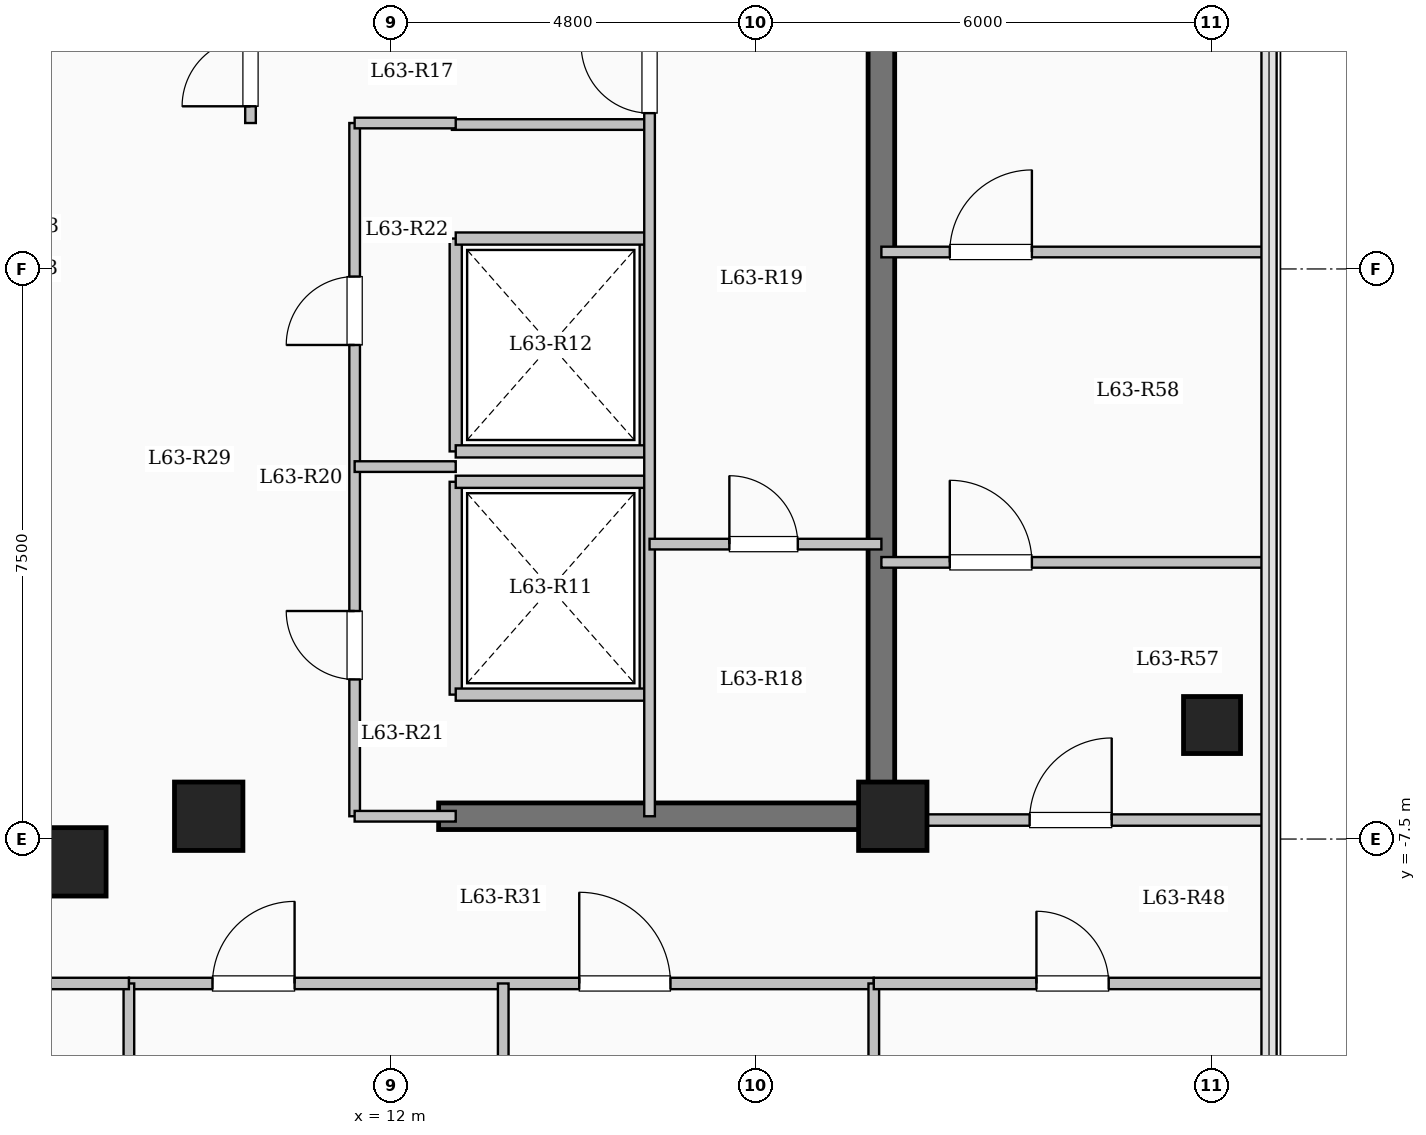
"""IFC4 building model, lengths in metres.
Left out: names, types, materials, properties, quantities, classifications, styles, units other than length and angle.
Written with IfcOpenShell. Run it as: python <this file> out.ifc"""

import sys

from ifc_helpers import new_model, si_unit, direction, frame, frame_2d, origin, origin_2d, place, context, subcontext, project, spatial, rectangle, extrude, element, fill, save


model = new_model("IFC4")
c1 = context("Model", 3, precision=1e-05, world=origin(), true_north=direction((0.0, 1.0)))
c2 = subcontext(c1, "Body", "Model", "MODEL_VIEW")
j1 = project(units=[si_unit("LENGTHUNIT", "METRE"), si_unit("PLANEANGLEUNIT", "RADIAN")], contexts=[c1])
p1 = place(None, origin())
s1 = spatial("IfcSite", under=j1, at=p1, CompositionType="ELEMENT")
p2 = place(p1, origin())
s2 = spatial("IfcBuilding", under=s1, at=p2, CompositionType="ELEMENT")
p3 = place(p2, frame((0.0, 0.0, 231.75)))
s3 = spatial("IfcBuildingStorey", under=s2, at=p3, CompositionType="ELEMENT", Elevation=231.75)
for number, where, z_axis, x_axis in (
    (1, (7.8, -7.8, 0.0), (0.0, 0.0, 1.0), (1.0, 0.0, 0.0)),
    (2, (9.6, -7.2, 0.0), (0.0, 0.0, 1.0), (1.0, 0.0, 0.0)),
    (3, (18.6, -7.2, 0.0), (0.0, 0.0, 1.0), (1.0, 0.0, 0.0)),
):
    element("IfcColumn", number, at=place(p3, frame(where, z_axis=z_axis, x_axis=x_axis)), inside=s3, PredefinedType="COLUMN", context=c2, shape_type="SweptSolid", body=[
        extrude(rectangle(XDim=0.9, YDim=0.9, at=origin_2d()), origin(), (0.0, 0.0, 1.0), 4.65),
    ])
p4 = place(p3, frame((22.8, -6.0, 0.0), z_axis=(0.0, 0.0, 1.0), x_axis=(1.0, 0.0, 0.0)))
e4 = element("IfcColumn", 4, at=p4, inside=s3, PredefinedType="COLUMN", context=c2, shape_type="SweptSolid", body=[
    extrude(rectangle(XDim=0.75, YDim=0.75, at=origin_2d()), origin(), (0.0, 0.0, 1.0), 4.65),
])
for number, where, z_axis, x_axis in (
    (5, (12.85, -5.6, 0.0), (0.0, 0.0, 1.0), (0.0, 1.0, 0.0)),
    (6, (15.35, -5.6, 0.0), (0.0, 0.0, 1.0), (0.0, 1.0, 0.0)),
):
    element("IfcWall", number, at=place(p3, frame(where, z_axis=z_axis, x_axis=x_axis)), inside=s3, PredefinedType="SOLIDWALL", context=c2, shape_type="SweptSolid", body=[
        extrude(rectangle(XDim=2.8, YDim=0.16, at=frame_2d((1.4, 0.0))), origin(), (0.0, 0.0, 1.0), 4.35),
    ])
for number, where, z_axis, x_axis in (
    (7, (12.85, -5.6, 0.0), (0.0, 0.0, 1.0), (1.0, 0.0, 0.0)),
    (8, (12.85, -2.8, 0.0), (0.0, 0.0, 1.0), (1.0, 0.0, 0.0)),
):
    element("IfcWall", number, at=place(p3, frame(where, z_axis=z_axis, x_axis=x_axis)), inside=s3, PredefinedType="SOLIDWALL", context=c2, shape_type="SweptSolid", body=[
        extrude(rectangle(XDim=2.5, YDim=0.16, at=frame_2d((1.25, 0.0))), origin(), (0.0, 0.0, 1.0), 4.35),
    ])
for number, where, z_axis, x_axis in (
    (9, (12.85, -2.4, 0.0), (0.0, 0.0, 1.0), (0.0, 1.0, 0.0)),
    (10, (15.35, -2.4, 0.0), (0.0, 0.0, 1.0), (0.0, 1.0, 0.0)),
):
    element("IfcWall", number, at=place(p3, frame(where, z_axis=z_axis, x_axis=x_axis)), inside=s3, PredefinedType="SOLIDWALL", context=c2, shape_type="SweptSolid", body=[
        extrude(rectangle(XDim=2.8, YDim=0.16, at=frame_2d((1.4, 0.0))), origin(), (0.0, 0.0, 1.0), 4.35),
    ])
for number, where, z_axis, x_axis in (
    (11, (12.85, -2.4, 0.0), (0.0, 0.0, 1.0), (1.0, 0.0, 0.0)),
    (12, (12.85, 0.4, 0.0), (0.0, 0.0, 1.0), (1.0, 0.0, 0.0)),
):
    element("IfcWall", number, at=place(p3, frame(where, z_axis=z_axis, x_axis=x_axis)), inside=s3, PredefinedType="SOLIDWALL", context=c2, shape_type="SweptSolid", body=[
        extrude(rectangle(XDim=2.5, YDim=0.16, at=frame_2d((1.25, 0.0))), origin(), (0.0, 0.0, 1.0), 4.35),
    ])
p5 = place(p3, frame((18.45, -7.375, 0.0), z_axis=(0.0, 0.0, 1.0), x_axis=(0.0, 1.0, 0.0)))
e13 = element("IfcWall", 13, at=p5, inside=s3, PredefinedType="SHEAR", context=c2, shape_type="SweptSolid", body=[
    extrude(rectangle(XDim=14.05, YDim=0.35, at=frame_2d((7.025, 0.0))), origin(), (0.0, 0.0, 1.0), 4.65),
])
p6 = place(p3, frame((12.625, -7.2, 0.0), z_axis=(0.0, 0.0, 1.0), x_axis=(1.0, 0.0, 0.0)))
e14 = element("IfcWall", 14, at=p6, inside=s3, PredefinedType="SHEAR", context=c2, shape_type="SweptSolid", body=[
    extrude(rectangle(XDim=6.0, YDim=0.35, at=frame_2d((3.0, 0.0))), origin(), (0.0, 0.0, 1.0), 4.65),
])
p7 = place(p3, frame((12.8, 1.9, 0.0), z_axis=(0.0, 0.0, 1.0), x_axis=(1.0, 0.0, 0.0)))
e15 = element("IfcWall", 15, at=p7, inside=s3, PredefinedType="PARTITIONING", context=c2, shape_type="SweptSolid", body=[
    extrude(rectangle(XDim=2.6, YDim=0.14, at=frame_2d((1.3, 0.0))), origin(), (0.0, 0.0, 1.0), 4.35),
])
p8 = place(p3, frame((10.15, 1.92, 0.0), z_axis=(0.0, 0.0, 1.0), x_axis=(0.0, 1.0, 0.0)))
e16 = element("IfcWall", 16, at=p8, inside=s3, PredefinedType="PARTITIONING", context=c2, shape_type="SweptSolid", body=[
    extrude(rectangle(XDim=1.33, YDim=0.14, at=frame_2d((0.665, 0.0))), origin(), (0.0, 0.0, 1.0), 4.35),
])
p9 = place(p8, frame((0.22, 0.0, 0.0)))
e17 = element("IfcOpeningElement", 17, at=p9, cuts=e16, PredefinedType="OPENING", context=c2, shape_type="SweptSolid", body=[
    extrude(rectangle(XDim=0.9, YDim=2.08, at=frame_2d((0.45, 1.04))), frame((0.0, 0.08, 0.0), z_axis=(0.0, -1.0, 0.0), x_axis=(1.0, 0.0, 0.0)), (0.0, 0.0, 1.0), 0.16),
])
p10 = place(p3, frame((15.4, -7.2, 0.0), z_axis=(0.0, 0.0, 1.0), x_axis=(0.0, 1.0, 0.0)))
e18 = element("IfcWall", 18, at=p10, inside=s3, PredefinedType="PARTITIONING", context=c2, shape_type="SweptSolid", body=[
    extrude(rectangle(XDim=10.45, YDim=0.14, at=frame_2d((5.225, 0.0))), origin(), (0.0, 0.0, 1.0), 4.35),
])
p11 = place(p10, frame((9.25, 0.0, 0.0)))
e19 = element("IfcOpeningElement", 19, at=p11, cuts=e18, PredefinedType="OPENING", context=c2, shape_type="SweptSolid", body=[
    extrude(rectangle(XDim=0.9, YDim=2.08, at=frame_2d((0.45, 1.04))), frame((0.0, 0.08, 0.0), z_axis=(0.0, -1.0, 0.0), x_axis=(1.0, 0.0, 0.0)), (0.0, 0.0, 1.0), 0.16),
])
p12 = place(p3, frame((15.4, -3.62, 0.0), z_axis=(0.0, 0.0, 1.0), x_axis=(1.0, 0.0, 0.0)))
e20 = element("IfcWall", 20, at=p12, inside=s3, PredefinedType="PARTITIONING", context=c2, shape_type="SweptSolid", body=[
    extrude(rectangle(XDim=3.05, YDim=0.14, at=frame_2d((1.525, 0.0))), origin(), (0.0, 0.0, 1.0), 4.35),
])
p13 = place(p12, frame((1.05, 0.0, 0.0)))
e21 = element("IfcOpeningElement", 21, at=p13, cuts=e20, PredefinedType="OPENING", context=c2, shape_type="SweptSolid", body=[
    extrude(rectangle(XDim=0.9, YDim=2.08, at=frame_2d((0.45, 1.04))), frame((0.0, 0.08, 0.0), z_axis=(0.0, -1.0, 0.0), x_axis=(1.0, 0.0, 0.0)), (0.0, 0.0, 1.0), 0.16),
])
p14 = place(p3, frame((11.52, -7.2, 0.0), z_axis=(0.0, 0.0, 1.0), x_axis=(0.0, 1.0, 0.0)))
e22 = element("IfcWall", 22, at=p14, inside=s3, PredefinedType="PARTITIONING", context=c2, shape_type="SweptSolid", body=[
    extrude(rectangle(XDim=9.12, YDim=0.14, at=frame_2d((4.56, 0.0))), origin(), (0.0, 0.0, 1.0), 4.35),
])
p15 = place(p14, frame((1.8, 0.0, 0.0)))
e23 = element("IfcOpeningElement", 23, at=p15, cuts=e22, PredefinedType="OPENING", context=c2, shape_type="SweptSolid", body=[
    extrude(rectangle(XDim=0.9, YDim=2.08, at=frame_2d((0.45, 1.04))), frame((0.0, 0.08, 0.0), z_axis=(0.0, -1.0, 0.0), x_axis=(1.0, 0.0, 0.0)), (0.0, 0.0, 1.0), 0.16),
])
p16 = place(p14, frame((6.2, 0.0, 0.0)))
e24 = element("IfcOpeningElement", 24, at=p16, cuts=e22, PredefinedType="OPENING", context=c2, shape_type="SweptSolid", body=[
    extrude(rectangle(XDim=0.9, YDim=2.08, at=frame_2d((0.45, 1.04))), frame((0.0, 0.08, 0.0), z_axis=(0.0, -1.0, 0.0), x_axis=(1.0, 0.0, 0.0)), (0.0, 0.0, 1.0), 0.16),
])
p17 = place(p3, frame((11.52, 1.92, 0.0), z_axis=(0.0, 0.0, 1.0), x_axis=(1.0, 0.0, 0.0)))
e25 = element("IfcWall", 25, at=p17, inside=s3, PredefinedType="PARTITIONING", context=c2, shape_type="SweptSolid", body=[
    extrude(rectangle(XDim=1.33, YDim=0.14, at=frame_2d((0.665, 0.0))), origin(), (0.0, 0.0, 1.0), 4.35),
])
p18 = place(p3, frame((11.52, -7.2, 0.0), z_axis=(0.0, 0.0, 1.0), x_axis=(1.0, 0.0, 0.0)))
e26 = element("IfcWall", 26, at=p18, inside=s3, PredefinedType="PARTITIONING", context=c2, shape_type="SweptSolid", body=[
    extrude(rectangle(XDim=1.33, YDim=0.14, at=frame_2d((0.665, 0.0))), origin(), (0.0, 0.0, 1.0), 3.485),
])
p19 = place(p3, frame((11.52, -2.6, 0.0), z_axis=(0.0, 0.0, 1.0), x_axis=(1.0, 0.0, 0.0)))
e27 = element("IfcWall", 27, at=p19, inside=s3, PredefinedType="PARTITIONING", context=c2, shape_type="SweptSolid", body=[
    extrude(rectangle(XDim=1.33, YDim=0.14, at=frame_2d((0.665, 0.0))), origin(), (0.0, 0.0, 1.0), 4.35),
])
p20 = place(p3, frame((8.55, -9.4, 0.0), z_axis=(0.0, 0.0, 1.0), x_axis=(1.0, 0.0, 0.0)))
e28 = element("IfcWall", 28, at=p20, inside=s3, PredefinedType="PARTITIONING", context=c2, shape_type="SweptSolid", body=[
    extrude(rectangle(XDim=9.8, YDim=0.15, at=frame_2d((4.9, 0.0))), origin(), (0.0, 0.0, 1.0), 4.35),
])
p21 = place(p20, frame((1.1, 0.0, 0.0)))
e29 = element("IfcOpeningElement", 29, at=p21, cuts=e28, PredefinedType="OPENING", context=c2, shape_type="SweptSolid", body=[
    extrude(rectangle(XDim=1.08, YDim=2.15, at=frame_2d((0.54, 1.075))), frame((0.0, 0.085, 0.0), z_axis=(0.0, -1.0, 0.0), x_axis=(1.0, 0.0, 0.0)), (0.0, 0.0, 1.0), 0.17),
])
p22 = place(p20, frame((5.925, 0.0, 0.0)))
e30 = element("IfcOpeningElement", 30, at=p22, cuts=e28, PredefinedType="OPENING", context=c2, shape_type="SweptSolid", body=[
    extrude(rectangle(XDim=1.2, YDim=2.15, at=frame_2d((0.6, 1.075))), frame((0.0, 0.085, 0.0), z_axis=(0.0, -1.0, 0.0), x_axis=(1.0, 0.0, 0.0)), (0.0, 0.0, 1.0), 0.17),
])
p23 = place(p3, frame((8.55, -21.504, 0.0), z_axis=(0.0, 0.0, 1.0), x_axis=(0.0, 1.0, 0.0)))
e31 = element("IfcWall", 31, at=p23, inside=s3, PredefinedType="PARTITIONING", context=c2, shape_type="SweptSolid", body=[
    extrude(rectangle(XDim=12.104, YDim=0.14, at=frame_2d((6.052, 0.0))), origin(), (0.0, 0.0, 1.0), 4.35),
])
p24 = place(p3, frame((13.475, -20.9, 0.0), z_axis=(0.0, 0.0, 1.0), x_axis=(0.0, 1.0, 0.0)))
e32 = element("IfcWall", 32, at=p24, inside=s3, PredefinedType="PARTITIONING", context=c2, shape_type="SweptSolid", body=[
    extrude(rectangle(XDim=11.5, YDim=0.14, at=frame_2d((5.75, 0.0))), origin(), (0.0, 0.0, 1.0), 4.35),
])
p25 = place(p3, frame((-8.55, -9.4, 0.0), z_axis=(0.0, 0.0, 1.0), x_axis=(1.0, 0.0, 0.0)))
e33 = element("IfcWall", 33, at=p25, inside=s3, PredefinedType="PARTITIONING", context=c2, shape_type="SweptSolid", body=[
    extrude(rectangle(XDim=17.1, YDim=0.15, at=frame_2d((8.55, 0.0))), origin(), (0.0, 0.0, 1.0), 4.35),
])
p26 = place(p25, frame((1.85, 0.0, 0.0)))
e34 = element("IfcOpeningElement", 34, at=p26, cuts=e33, PredefinedType="OPENING", context=c2, shape_type="SweptSolid", body=[
    extrude(rectangle(XDim=1.08, YDim=2.15, at=frame_2d((0.54, 1.075))), frame((0.0, 0.085, 0.0), z_axis=(0.0, -1.0, 0.0), x_axis=(1.0, 0.0, 0.0)), (0.0, 0.0, 1.0), 0.17),
])
p27 = place(p25, frame((10.5, 0.0, 0.0)))
e35 = element("IfcOpeningElement", 35, at=p27, cuts=e33, PredefinedType="OPENING", context=c2, shape_type="SweptSolid", body=[
    extrude(rectangle(XDim=1.08, YDim=2.15, at=frame_2d((0.54, 1.075))), frame((0.0, 0.085, 0.0), z_axis=(0.0, -1.0, 0.0), x_axis=(1.0, 0.0, 0.0)), (0.0, 0.0, 1.0), 0.17),
])
p28 = place(p3, frame((18.45, -7.25, 0.0), z_axis=(0.0, 0.0, 1.0), x_axis=(1.0, 0.0, 0.0)))
e36 = element("IfcWall", 36, at=p28, inside=s3, PredefinedType="PARTITIONING", context=c2, shape_type="SweptSolid", body=[
    extrude(rectangle(XDim=5.13, YDim=0.15, at=frame_2d((2.565, 0.0))), origin(), (0.0, 0.0, 1.0), 4.35),
])
p29 = place(p28, frame((1.95, 0.0, 0.0)))
e37 = element("IfcOpeningElement", 37, at=p29, cuts=e36, PredefinedType="OPENING", context=c2, shape_type="SweptSolid", body=[
    extrude(rectangle(XDim=1.08, YDim=2.15, at=frame_2d((0.54, 1.075))), frame((0.0, 0.085, 0.0), z_axis=(0.0, -1.0, 0.0), x_axis=(1.0, 0.0, 0.0)), (0.0, 0.0, 1.0), 0.17),
])
p30 = place(p3, frame((18.35, -17.25, 0.0), z_axis=(0.0, 0.0, 1.0), x_axis=(0.0, 1.0, 0.0)))
e38 = element("IfcWall", 38, at=p30, inside=s3, PredefinedType="PARTITIONING", context=c2, shape_type="SweptSolid", body=[
    extrude(rectangle(XDim=7.85, YDim=0.14, at=frame_2d((3.925, 0.0))), origin(), (0.0, 0.0, 1.0), 4.35),
])
p31 = place(p3, frame((18.35, -9.4, 0.0), z_axis=(0.0, 0.0, 1.0), x_axis=(1.0, 0.0, 0.0)))
e39 = element("IfcWall", 39, at=p31, inside=s3, PredefinedType="PARTITIONING", context=c2, shape_type="SweptSolid", body=[
    extrude(rectangle(XDim=5.23, YDim=0.15, at=frame_2d((2.615, 0.0))), origin(), (0.0, 0.0, 1.0), 4.35),
])
p32 = place(p31, frame((2.14, 0.0, 0.0)))
e40 = element("IfcOpeningElement", 40, at=p32, cuts=e39, PredefinedType="OPENING", context=c2, shape_type="SweptSolid", body=[
    extrude(rectangle(XDim=0.95, YDim=2.15, at=frame_2d((0.475, 1.075))), frame((0.0, 0.085, 0.0), z_axis=(0.0, -1.0, 0.0), x_axis=(1.0, 0.0, 0.0)), (0.0, 0.0, 1.0), 0.17),
])
p33 = place(p3, frame((18.45, -3.86, 0.0), z_axis=(0.0, 0.0, 1.0), x_axis=(1.0, 0.0, 0.0)))
e41 = element("IfcWall", 41, at=p33, inside=s3, PredefinedType="PARTITIONING", context=c2, shape_type="SweptSolid", body=[
    extrude(rectangle(XDim=5.13, YDim=0.14, at=frame_2d((2.565, 0.0))), origin(), (0.0, 0.0, 1.0), 4.35),
])
p34 = place(p33, frame((0.9, 0.0, 0.0)))
e42 = element("IfcOpeningElement", 42, at=p34, cuts=e41, PredefinedType="OPENING", context=c2, shape_type="SweptSolid", body=[
    extrude(rectangle(XDim=1.08, YDim=2.15, at=frame_2d((0.54, 1.075))), frame((0.0, 0.08, 0.0), z_axis=(0.0, -1.0, 0.0), x_axis=(1.0, 0.0, 0.0)), (0.0, 0.0, 1.0), 0.16),
])
p35 = place(p3, frame((18.45, 0.223, 0.0), z_axis=(0.0, 0.0, 1.0), x_axis=(1.0, 0.0, 0.0)))
e43 = element("IfcWall", 43, at=p35, inside=s3, PredefinedType="PARTITIONING", context=c2, shape_type="SweptSolid", body=[
    extrude(rectangle(XDim=5.13, YDim=0.14, at=frame_2d((2.565, 0.0))), origin(), (0.0, 0.0, 1.0), 4.35),
])
p36 = place(p35, frame((0.9, 0.0, 0.0)))
e44 = element("IfcOpeningElement", 44, at=p36, cuts=e43, PredefinedType="OPENING", context=c2, shape_type="SweptSolid", body=[
    extrude(rectangle(XDim=1.08, YDim=2.15, at=frame_2d((0.54, 1.075))), frame((0.0, 0.08, 0.0), z_axis=(0.0, -1.0, 0.0), x_axis=(1.0, 0.0, 0.0)), (0.0, 0.0, 1.0), 0.16),
])
p37 = place(p9, origin())
e45 = element("IfcDoor", 45, at=p37, inside=s3, OperationType="SINGLE_SWING_LEFT", PredefinedType="DOOR", context=c2, shape_type="SweptSolid", body=[
    extrude(rectangle(XDim=0.9, YDim=2.08, at=frame_2d((0.45, 1.04))), frame((0.0, 0.025, 0.0), z_axis=(0.0, -1.0, 0.0), x_axis=(1.0, 0.0, 0.0)), (0.0, 0.0, 1.0), 0.05),
])
fill(e17, e45)
p38 = place(p11, origin())
e46 = element("IfcDoor", 46, at=p38, inside=s3, OperationType="SINGLE_SWING_RIGHT", PredefinedType="DOOR", context=c2, shape_type="SweptSolid", body=[
    extrude(rectangle(XDim=0.9, YDim=2.08, at=frame_2d((0.45, 1.04))), frame((0.0, 0.025, 0.0), z_axis=(0.0, -1.0, 0.0), x_axis=(1.0, 0.0, 0.0)), (0.0, 0.0, 1.0), 0.05),
])
fill(e19, e46)
p39 = place(p13, origin())
e47 = element("IfcDoor", 47, at=p39, inside=s3, OperationType="SINGLE_SWING_LEFT", PredefinedType="DOOR", context=c2, shape_type="SweptSolid", body=[
    extrude(rectangle(XDim=0.9, YDim=2.08, at=frame_2d((0.45, 1.04))), frame((0.0, 0.025, 0.0), z_axis=(0.0, -1.0, 0.0), x_axis=(1.0, 0.0, 0.0)), (0.0, 0.0, 1.0), 0.05),
])
fill(e21, e47)
p40 = place(p15, origin())
e48 = element("IfcDoor", 48, at=p40, inside=s3, OperationType="SINGLE_SWING_RIGHT", PredefinedType="DOOR", context=c2, shape_type="SweptSolid", body=[
    extrude(rectangle(XDim=0.9, YDim=2.08, at=frame_2d((0.45, 1.04))), frame((0.0, 0.025, 0.0), z_axis=(0.0, -1.0, 0.0), x_axis=(1.0, 0.0, 0.0)), (0.0, 0.0, 1.0), 0.05),
])
fill(e23, e48)
p41 = place(p16, origin())
e49 = element("IfcDoor", 49, at=p41, inside=s3, OperationType="SINGLE_SWING_LEFT", PredefinedType="DOOR", context=c2, shape_type="SweptSolid", body=[
    extrude(rectangle(XDim=0.9, YDim=2.08, at=frame_2d((0.45, 1.04))), frame((0.0, 0.025, 0.0), z_axis=(0.0, -1.0, 0.0), x_axis=(1.0, 0.0, 0.0)), (0.0, 0.0, 1.0), 0.05),
])
fill(e24, e49)
p42 = place(p21, origin())
e50 = element("IfcDoor", 50, at=p42, inside=s3, OperationType="SINGLE_SWING_RIGHT", PredefinedType="DOOR", context=c2, shape_type="SweptSolid", body=[
    extrude(rectangle(XDim=1.08, YDim=2.15, at=frame_2d((0.54, 1.075))), frame((0.0, 0.025, 0.0), z_axis=(0.0, -1.0, 0.0), x_axis=(1.0, 0.0, 0.0)), (0.0, 0.0, 1.0), 0.05),
])
fill(e29, e50)
p43 = place(p22, origin())
e51 = element("IfcDoor", 51, at=p43, inside=s3, OperationType="SINGLE_SWING_LEFT", PredefinedType="DOOR", context=c2, shape_type="SweptSolid", body=[
    extrude(rectangle(XDim=1.2, YDim=2.15, at=frame_2d((0.6, 1.075))), frame((0.0, 0.025, 0.0), z_axis=(0.0, -1.0, 0.0), x_axis=(1.0, 0.0, 0.0)), (0.0, 0.0, 1.0), 0.05),
])
fill(e30, e51)
p44 = place(p32, origin())
e52 = element("IfcDoor", 52, at=p44, inside=s3, OperationType="SINGLE_SWING_LEFT", PredefinedType="DOOR", context=c2, shape_type="SweptSolid", body=[
    extrude(rectangle(XDim=0.95, YDim=2.15, at=frame_2d((0.475, 1.075))), frame((0.0, 0.025, 0.0), z_axis=(0.0, -1.0, 0.0), x_axis=(1.0, 0.0, 0.0)), (0.0, 0.0, 1.0), 0.05),
])
fill(e40, e52)
p45 = place(p29, origin())
e53 = element("IfcDoor", 53, at=p45, inside=s3, OperationType="SINGLE_SWING_RIGHT", PredefinedType="DOOR", context=c2, shape_type="SweptSolid", body=[
    extrude(rectangle(XDim=1.08, YDim=2.15, at=frame_2d((0.54, 1.075))), frame((0.0, 0.025, 0.0), z_axis=(0.0, -1.0, 0.0), x_axis=(1.0, 0.0, 0.0)), (0.0, 0.0, 1.0), 0.05),
])
fill(e37, e53)
p46 = place(p34, origin())
e54 = element("IfcDoor", 54, at=p46, inside=s3, OperationType="SINGLE_SWING_LEFT", PredefinedType="DOOR", context=c2, shape_type="SweptSolid", body=[
    extrude(rectangle(XDim=1.08, YDim=2.15, at=frame_2d((0.54, 1.075))), frame((0.0, 0.025, 0.0), z_axis=(0.0, -1.0, 0.0), x_axis=(1.0, 0.0, 0.0)), (0.0, 0.0, 1.0), 0.05),
])
fill(e42, e54)
p47 = place(p36, origin())
e55 = element("IfcDoor", 55, at=p47, inside=s3, OperationType="SINGLE_SWING_RIGHT", PredefinedType="DOOR", context=c2, shape_type="SweptSolid", body=[
    extrude(rectangle(XDim=1.08, YDim=2.15, at=frame_2d((0.54, 1.075))), frame((0.0, 0.025, 0.0), z_axis=(0.0, -1.0, 0.0), x_axis=(1.0, 0.0, 0.0)), (0.0, 0.0, 1.0), 0.05),
])
fill(e44, e55)
save(model, sys.argv[1])
